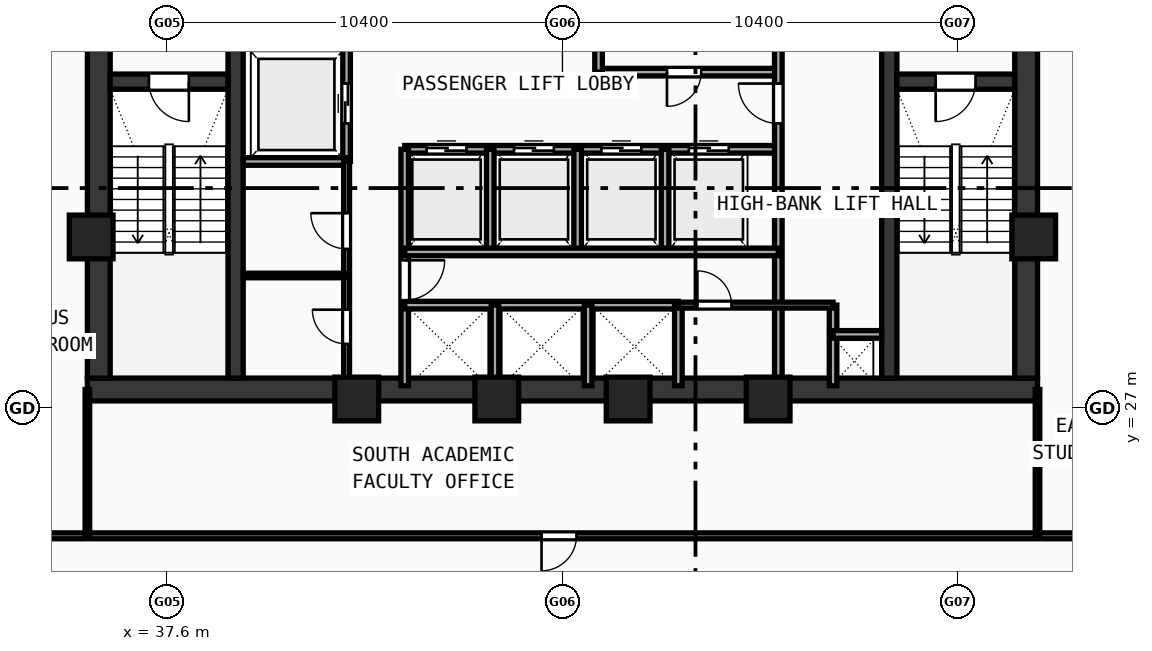
"""IFC4 building model, lengths in metres.
Left out: names, types, materials, properties, quantities, classifications, styles, units other than length and angle.
Written with IfcOpenShell. Run it as: python <this file> out.ifc"""

import sys

from ifc_helpers import new_model, si_unit, direction, frame, frame_2d, origin, origin_with_axes, origin_2d, place, context, subcontext, project, spatial, rectangle, hollow_rectangle, extrude, source, transform, mapped, element, fill, save


model = new_model("IFC4")
c1 = context("Model", 3, precision=1e-05, world=origin(), true_north=direction((0.0, 1.0)))
c2 = subcontext(c1, "Body", "Model", "MODEL_VIEW")
j1 = project(units=[si_unit("LENGTHUNIT", "METRE"), si_unit("PLANEANGLEUNIT", "RADIAN")], contexts=[c1])
p1 = place(None, origin())
s1 = spatial("IfcSite", under=j1, at=p1, CompositionType="ELEMENT")
p2 = place(p1, origin())
s2 = spatial("IfcBuilding", under=s1, at=p2, CompositionType="ELEMENT")
p3 = place(p2, frame((0.0, 0.0, 133.51)))
s3 = spatial("IfcBuildingStorey", under=s2, at=p3, CompositionType="ELEMENT", Elevation=133.51)
p4 = place(p3, frame((35.5, 27.5, 0.0), z_axis=(0.0, 0.0, 1.0), x_axis=(1.0, 0.0, 0.0)))
e1 = element("IfcWall", 1, at=p4, inside=s3, PredefinedType="SHEAR", context=c2, shape_type="SweptSolid", body=[
    extrude(rectangle(XDim=25.0, YDim=0.6, at=frame_2d((12.5, 0.0))), origin(), (0.0, 0.0, 1.0), 3.42),
])
for number, where, z_axis, x_axis in (
    (2, (35.8, 27.8, 0.0), (0.0, 0.0, 1.0), (0.0, 1.0, 0.0)),
    (3, (60.2, 27.8, 0.0), (0.0, 0.0, 1.0), (0.0, 1.0, 0.0)),
):
    element("IfcWall", number, at=place(p3, frame(where, z_axis=z_axis, x_axis=x_axis)), inside=s3, PredefinedType="SHEAR", context=c2, shape_type="SweptSolid", body=[
        extrude(rectangle(XDim=12.1, YDim=0.6, at=frame_2d((6.05, 0.0))), origin(), (0.0, 0.0, 1.0), 3.42),
    ])
p5 = place(p3, frame((39.4, 27.8, 0.0), z_axis=(0.0, 0.0, 1.0), x_axis=(0.0, 1.0, 0.0)))
e4 = element("IfcWall", 4, at=p5, inside=s3, PredefinedType="SHEAR", context=c2, shape_type="SweptSolid", body=[
    extrude(rectangle(XDim=12.1, YDim=0.4, at=frame_2d((6.05, 0.0))), origin(), (0.0, 0.0, 1.0), 3.42),
])
p6 = place(p5, frame((9.95, 0.0, 0.0)))
e5 = element("IfcOpeningElement", 5, at=p6, cuts=e4, PredefinedType="OPENING", context=c2, shape_type="SweptSolid", body=[
    extrude(rectangle(XDim=1.1, YDim=2.1, at=frame_2d((0.55, 1.05))), frame((0.0, 0.21, 0.0), z_axis=(0.0, -1.0, 0.0), x_axis=(1.0, 0.0, 0.0)), (0.0, 0.0, 1.0), 0.42),
])
p7 = place(p3, frame((56.6, 27.8, 0.0), z_axis=(0.0, 0.0, 1.0), x_axis=(0.0, 1.0, 0.0)))
e6 = element("IfcWall", 6, at=p7, inside=s3, PredefinedType="SHEAR", context=c2, shape_type="SweptSolid", body=[
    extrude(rectangle(XDim=12.1, YDim=0.4, at=frame_2d((6.05, 0.0))), origin(), (0.0, 0.0, 1.0), 3.42),
])
p8 = place(p7, frame((9.95, 0.0, 0.0)))
e7 = element("IfcOpeningElement", 7, at=p8, cuts=e6, PredefinedType="OPENING", context=c2, shape_type="SweptSolid", body=[
    extrude(rectangle(XDim=1.1, YDim=2.1, at=frame_2d((0.55, 1.05))), frame((0.0, 0.21, 0.0), z_axis=(0.0, -1.0, 0.0), x_axis=(1.0, 0.0, 0.0)), (0.0, 0.0, 1.0), 0.42),
])
p9 = place(p3, frame((36.1, 35.6, 0.0), z_axis=(0.0, 0.0, 1.0), x_axis=(1.0, 0.0, 0.0)))
e8 = element("IfcWall", 8, at=p9, inside=s3, PredefinedType="SHEAR", context=c2, shape_type="SweptSolid", body=[
    extrude(rectangle(XDim=3.1, YDim=0.4, at=frame_2d((1.55, 0.0))), origin(), (0.0, 0.0, 1.0), 3.42),
])
p10 = place(p9, frame((1.02, 0.0, 0.0)))
e9 = element("IfcOpeningElement", 9, at=p10, cuts=e8, PredefinedType="OPENING", context=c2, shape_type="SweptSolid", body=[
    extrude(rectangle(XDim=1.05, YDim=2.1, at=frame_2d((0.525, 1.05))), frame((0.0, 0.21, 0.0), z_axis=(0.0, -1.0, 0.0), x_axis=(1.0, 0.0, 0.0)), (0.0, 0.0, 1.0), 0.42),
])
p11 = place(p3, frame((56.8, 35.6, 0.0), z_axis=(0.0, 0.0, 1.0), x_axis=(1.0, 0.0, 0.0)))
e10 = element("IfcWall", 10, at=p11, inside=s3, PredefinedType="SHEAR", context=c2, shape_type="SweptSolid", body=[
    extrude(rectangle(XDim=3.1, YDim=0.4, at=frame_2d((1.55, 0.0))), origin(), (0.0, 0.0, 1.0), 3.42),
])
p12 = place(p11, frame((1.02, 0.0, 0.0)))
e11 = element("IfcOpeningElement", 11, at=p12, cuts=e10, PredefinedType="OPENING", context=c2, shape_type="SweptSolid", body=[
    extrude(rectangle(XDim=1.05, YDim=2.1, at=frame_2d((0.525, 1.05))), frame((0.0, 0.21, 0.0), z_axis=(0.0, -1.0, 0.0), x_axis=(1.0, 0.0, 0.0)), (0.0, 0.0, 1.0), 0.42),
])
m1 = source(origin(), c2, "Body", "SweptSolid", [
    extrude(hollow_rectangle(XDim=1.15, YDim=1.15, WallThickness=0.048, at=origin_2d()), origin(), (0.0, 0.0, 1.0), 3.68),
])
for number, where, z_axis, x_axis in (
    (12, (42.588, 27.25, -0.26), (0.0, 0.0, 1.0), (1.0, 0.0, 0.0)),
    (13, (46.272, 27.25, -0.26), (0.0, 0.0, 1.0), (1.0, 0.0, 0.0)),
    (14, (49.729, 27.25, -0.26), (0.0, 0.0, 1.0), (1.0, 0.0, 0.0)),
    (15, (53.412, 27.25, -0.26), (0.0, 0.0, 1.0), (1.0, 0.0, 0.0)),
    (16, (60.4, 31.513, -0.26), (0.0, 0.0, 1.0), (1.0, 0.0, 0.0)),
    (17, (35.6, 31.513, -0.26), (0.0, 0.0, 1.0), (1.0, 0.0, 0.0)),
):
    element("IfcColumn", number, at=place(p3, frame(where, z_axis=z_axis, x_axis=x_axis)), inside=s3, PredefinedType="COLUMN", context=c2, shape_type="MappedRepresentation", body=[
        mapped(m1, transform((0.0, 0.0, 0.0), scale=1.0)),
    ])
p13 = place(p3, frame((42.32, 33.5, 0.0), z_axis=(0.0, 0.0, 1.0), x_axis=(0.0, 1.0, 0.0)))
e18 = element("IfcWall", 18, at=p13, inside=s3, PredefinedType="SOLIDWALL", context=c2, shape_type="SweptSolid", body=[
    extrude(rectangle(XDim=6.45, YDim=0.2, at=frame_2d((3.225, 0.0))), origin(), (0.0, 0.0, 1.0), 3.42),
])
p14 = place(p13, frame((1.0, 0.0, 0.0)))
e19 = element("IfcOpeningElement", 19, at=p14, cuts=e18, PredefinedType="OPENING", context=c2, shape_type="SweptSolid", body=[
    extrude(rectangle(XDim=1.05, YDim=2.1, at=frame_2d((0.525, 1.05))), frame((0.0, 0.11, 0.0), z_axis=(0.0, -1.0, 0.0), x_axis=(1.0, 0.0, 0.0)), (0.0, 0.0, 1.0), 0.22),
])
p15 = place(p3, frame((39.6, 33.5, 0.0), z_axis=(0.0, 0.0, 1.0), x_axis=(1.0, 0.0, 0.0)))
e20 = element("IfcWall", 20, at=p15, inside=s3, PredefinedType="SOLIDWALL", context=c2, shape_type="SweptSolid", body=[
    extrude(rectangle(XDim=2.72, YDim=0.2, at=frame_2d((1.36, 0.0))), origin(), (0.0, 0.0, 1.0), 3.42),
])
p16 = place(p3, frame((48.95, 35.85, 0.0), z_axis=(0.0, 0.0, 1.0), x_axis=(1.0, 0.0, 0.0)))
e21 = element("IfcWall", 21, at=p16, inside=s3, PredefinedType="SOLIDWALL", context=c2, shape_type="SweptSolid", body=[
    extrude(rectangle(XDim=4.73, YDim=0.2, at=frame_2d((2.365, 0.0))), origin(), (0.0, 0.0, 1.0), 3.42),
])
p17 = place(p16, frame((1.8, 0.0, 0.0)))
e22 = element("IfcOpeningElement", 22, at=p17, cuts=e21, PredefinedType="OPENING", context=c2, shape_type="SweptSolid", body=[
    extrude(rectangle(XDim=0.9, YDim=2.1, at=frame_2d((0.45, 1.05))), frame((0.0, 0.11, 0.0), z_axis=(0.0, -1.0, 0.0), x_axis=(1.0, 0.0, 0.0)), (0.0, 0.0, 1.0), 0.22),
])
p18 = place(p3, frame((48.95, 35.85, 0.0), z_axis=(0.0, 0.0, 1.0), x_axis=(0.0, 1.0, 0.0)))
e23 = element("IfcWall", 23, at=p18, inside=s3, PredefinedType="SOLIDWALL", context=c2, shape_type="SweptSolid", body=[
    extrude(rectangle(XDim=4.1, YDim=0.2, at=frame_2d((2.05, 0.0))), origin(), (0.0, 0.0, 1.0), 3.42),
])
p19 = place(p3, frame((43.85, 33.82, 0.0), z_axis=(0.0, 0.0, 1.0), x_axis=(1.0, 0.0, 0.0)))
e24 = element("IfcWall", 24, at=p19, inside=s3, PredefinedType="SOLIDWALL", context=c2, shape_type="SweptSolid", body=[
    extrude(rectangle(XDim=9.83, YDim=0.2, at=frame_2d((4.915, 0.0))), origin(), (0.0, 0.0, 1.0), 3.42),
])
p20 = place(p19, frame((0.575, 0.0, 0.0)))
e25 = element("IfcOpeningElement", 25, at=p20, cuts=e24, PredefinedType="OPENING", context=c2, shape_type="SweptSolid", body=[
    extrude(rectangle(XDim=1.05, YDim=2.1, at=frame_2d((0.525, 1.05))), frame((0.0, 0.11, 0.0), z_axis=(0.0, -1.0, 0.0), x_axis=(1.0, 0.0, 0.0)), (0.0, 0.0, 1.0), 0.22),
])
p21 = place(p19, frame((2.875, 0.0, 0.0)))
e26 = element("IfcOpeningElement", 26, at=p21, cuts=e24, PredefinedType="OPENING", context=c2, shape_type="SweptSolid", body=[
    extrude(rectangle(XDim=1.05, YDim=2.1, at=frame_2d((0.525, 1.05))), frame((0.0, 0.11, 0.0), z_axis=(0.0, -1.0, 0.0), x_axis=(1.0, 0.0, 0.0)), (0.0, 0.0, 1.0), 0.22),
])
p22 = place(p19, frame((5.175, 0.0, 0.0)))
e27 = element("IfcOpeningElement", 27, at=p22, cuts=e24, PredefinedType="OPENING", context=c2, shape_type="SweptSolid", body=[
    extrude(rectangle(XDim=1.05, YDim=2.1, at=frame_2d((0.525, 1.05))), frame((0.0, 0.11, 0.0), z_axis=(0.0, -1.0, 0.0), x_axis=(1.0, 0.0, 0.0)), (0.0, 0.0, 1.0), 0.22),
])
p23 = place(p19, frame((7.475, 0.0, 0.0)))
e28 = element("IfcOpeningElement", 28, at=p23, cuts=e24, PredefinedType="OPENING", context=c2, shape_type="SweptSolid", body=[
    extrude(rectangle(XDim=1.05, YDim=2.1, at=frame_2d((0.525, 1.05))), frame((0.0, 0.11, 0.0), z_axis=(0.0, -1.0, 0.0), x_axis=(1.0, 0.0, 0.0)), (0.0, 0.0, 1.0), 0.22),
])
p24 = place(p3, frame((43.85, 27.6, 0.0), z_axis=(0.0, 0.0, 1.0), x_axis=(0.0, 1.0, 0.0)))
e29 = element("IfcWall", 29, at=p24, inside=s3, PredefinedType="SOLIDWALL", context=c2, shape_type="SweptSolid", body=[
    extrude(rectangle(XDim=6.22, YDim=0.2, at=frame_2d((3.11, 0.0))), origin(), (0.0, 0.0, 1.0), 3.42),
])
p25 = place(p24, frame((2.25, 0.0, 0.0)))
e30 = element("IfcOpeningElement", 30, at=p25, cuts=e29, PredefinedType="OPENING", context=c2, shape_type="SweptSolid", body=[
    extrude(rectangle(XDim=1.05, YDim=2.1, at=frame_2d((0.525, 1.05))), frame((0.0, 0.11, 0.0), z_axis=(0.0, -1.0, 0.0), x_axis=(1.0, 0.0, 0.0)), (0.0, 0.0, 1.0), 0.22),
])
p26 = place(p3, frame((53.68, 27.6, 0.0), z_axis=(0.0, 0.0, 1.0), x_axis=(0.0, 1.0, 0.0)))
e31 = element("IfcWall", 31, at=p26, inside=s3, PredefinedType="SOLIDWALL", context=c2, shape_type="SweptSolid", body=[
    extrude(rectangle(XDim=9.05, YDim=0.2, at=frame_2d((4.525, 0.0))), origin(), (0.0, 0.0, 1.0), 3.42),
])
p27 = place(p26, frame((6.9, 0.0, 0.0)))
e32 = element("IfcOpeningElement", 32, at=p27, cuts=e31, PredefinedType="OPENING", context=c2, shape_type="SweptSolid", body=[
    extrude(rectangle(XDim=1.05, YDim=2.1, at=frame_2d((0.525, 1.05))), frame((0.0, 0.11, 0.0), z_axis=(0.0, -1.0, 0.0), x_axis=(1.0, 0.0, 0.0)), (0.0, 0.0, 1.0), 0.22),
])
for number, where, z_axis, x_axis in (
    (33, (46.1, 31.12, 0.0), (0.0, 0.0, 1.0), (0.0, 1.0, 0.0)),
    (34, (48.4, 31.12, 0.0), (0.0, 0.0, 1.0), (0.0, 1.0, 0.0)),
    (35, (50.7, 31.12, 0.0), (0.0, 0.0, 1.0), (0.0, 1.0, 0.0)),
):
    element("IfcWall", number, at=place(p3, frame(where, z_axis=z_axis, x_axis=x_axis)), inside=s3, PredefinedType="SOLIDWALL", context=c2, shape_type="SweptSolid", body=[
        extrude(rectangle(XDim=2.7, YDim=0.2, at=frame_2d((1.35, 0.0))), origin(), (0.0, 0.0, 1.0), 3.42),
    ])
p28 = place(p3, frame((43.85, 29.72, 0.0), z_axis=(0.0, 0.0, 1.0), x_axis=(1.0, 0.0, 0.0)))
e36 = element("IfcWall", 36, at=p28, inside=s3, PredefinedType="SOLIDWALL", context=c2, shape_type="SweptSolid", body=[
    extrude(rectangle(XDim=7.2, YDim=0.2, at=frame_2d((3.6, 0.0))), origin(), (0.0, 0.0, 1.0), 3.42),
])
p29 = place(p3, frame((51.05, 27.6, 0.0), z_axis=(0.0, 0.0, 1.0), x_axis=(0.0, 1.0, 0.0)))
e37 = element("IfcWall", 37, at=p29, inside=s3, PredefinedType="SOLIDWALL", context=c2, shape_type="SweptSolid", body=[
    extrude(rectangle(XDim=2.12, YDim=0.2, at=frame_2d((1.06, 0.0))), origin(), (0.0, 0.0, 1.0), 3.42),
])
p30 = place(p3, frame((43.85, 31.12, 0.0), z_axis=(0.0, 0.0, 1.0), x_axis=(1.0, 0.0, 0.0)))
e38 = element("IfcWall", 38, at=p30, inside=s3, PredefinedType="SOLIDWALL", context=c2, shape_type="SweptSolid", body=[
    extrude(rectangle(XDim=9.83, YDim=0.2, at=frame_2d((4.915, 0.0))), origin(), (0.0, 0.0, 1.0), 3.42),
])
for number, where, z_axis, x_axis in (
    (39, (46.225, 27.6, 0.0), (0.0, 0.0, 1.0), (0.0, 1.0, 0.0)),
    (40, (48.675, 27.6, 0.0), (0.0, 0.0, 1.0), (0.0, 1.0, 0.0)),
    (41, (55.12, 27.6, 0.0), (0.0, 0.0, 1.0), (0.0, 1.0, 0.0)),
):
    element("IfcWall", number, at=place(p3, frame(where, z_axis=z_axis, x_axis=x_axis)), inside=s3, PredefinedType="SOLIDWALL", context=c2, shape_type="SweptSolid", body=[
        extrude(rectangle(XDim=2.12, YDim=0.2, at=frame_2d((1.06, 0.0))), origin(), (0.0, 0.0, 1.0), 3.42),
    ])
p31 = place(p3, frame((55.12, 28.95, 0.0), z_axis=(0.0, 0.0, 1.0), x_axis=(1.0, 0.0, 0.0)))
e42 = element("IfcWall", 42, at=p31, inside=s3, PredefinedType="SOLIDWALL", context=c2, shape_type="SweptSolid", body=[
    extrude(rectangle(XDim=1.28, YDim=0.2, at=frame_2d((0.64, 0.0))), origin(), (0.0, 0.0, 1.0), 3.42),
])
p32 = place(p3, frame((42.32, 27.6, 0.0), z_axis=(0.0, 0.0, 1.0), x_axis=(0.0, 1.0, 0.0)))
e43 = element("IfcWall", 43, at=p32, inside=s3, PredefinedType="PARTITIONING", context=c2, shape_type="SweptSolid", body=[
    extrude(rectangle(XDim=5.9, YDim=0.155, at=frame_2d((2.95, 0.0))), origin(), (0.0, 0.0, 1.0), 3.42),
])
p33 = place(p32, frame((1.1, 0.0, 0.0)))
e44 = element("IfcOpeningElement", 44, at=p33, cuts=e43, PredefinedType="OPENING", context=c2, shape_type="SweptSolid", body=[
    extrude(rectangle(XDim=0.9, YDim=2.1, at=frame_2d((0.45, 1.05))), frame((0.0, 0.087, 0.0), z_axis=(0.0, -1.0, 0.0), x_axis=(1.0, 0.0, 0.0)), (0.0, 0.0, 1.0), 0.175),
])
p34 = place(p32, frame((3.6, 0.0, 0.0)))
e45 = element("IfcOpeningElement", 45, at=p34, cuts=e43, PredefinedType="OPENING", context=c2, shape_type="SweptSolid", body=[
    extrude(rectangle(XDim=0.94, YDim=2.1, at=frame_2d((0.47, 1.05))), frame((0.0, 0.087, 0.0), z_axis=(0.0, -1.0, 0.0), x_axis=(1.0, 0.0, 0.0)), (0.0, 0.0, 1.0), 0.175),
])
p35 = place(p3, frame((51.05, 29.72, 0.0), z_axis=(0.0, 0.0, 1.0), x_axis=(1.0, 0.0, 0.0)))
e46 = element("IfcWall", 46, at=p35, inside=s3, PredefinedType="PARTITIONING", context=c2, shape_type="SweptSolid", body=[
    extrude(rectangle(XDim=4.07, YDim=0.155, at=frame_2d((2.035, 0.0))), origin(), (0.0, 0.0, 1.0), 3.42),
])
p36 = place(p35, frame((0.5, 0.0, 0.0)))
e47 = element("IfcOpeningElement", 47, at=p36, cuts=e46, PredefinedType="OPENING", context=c2, shape_type="SweptSolid", body=[
    extrude(rectangle(XDim=0.9, YDim=2.1, at=frame_2d((0.45, 1.05))), frame((0.0, 0.087, 0.0), z_axis=(0.0, -1.0, 0.0), x_axis=(1.0, 0.0, 0.0)), (0.0, 0.0, 1.0), 0.175),
])
p37 = place(p3, frame((39.6, 30.5, 0.0), z_axis=(0.0, 0.0, 1.0), x_axis=(1.0, 0.0, 0.0)))
e48 = element("IfcWall", 48, at=p37, inside=s3, PredefinedType="PARTITIONING", context=c2, shape_type="SweptSolid", body=[
    extrude(rectangle(XDim=2.72, YDim=0.12, at=frame_2d((1.36, 0.0))), origin(), (0.0, 0.0, 1.0), 3.42),
])
p38 = place(p3, frame((31.45, 23.65, 0.0), z_axis=(0.0, 0.0, 1.0), x_axis=(1.0, 0.0, 0.0)))
e49 = element("IfcWall", 49, at=p38, inside=s3, PredefinedType="PARTITIONING", context=c2, shape_type="SweptSolid", body=[
    extrude(rectangle(XDim=33.1, YDim=0.155, at=frame_2d((16.55, 0.0))), origin(), (0.0, 0.0, 1.0), 2.77),
])
p39 = place(p38, frame((16.0, 0.0, 0.0)))
e50 = element("IfcOpeningElement", 50, at=p39, cuts=e49, PredefinedType="OPENING", context=c2, shape_type="SweptSolid", body=[
    extrude(rectangle(XDim=0.92, YDim=2.1, at=frame_2d((0.46, 1.05))), frame((0.0, 0.087, 0.0), z_axis=(0.0, -1.0, 0.0), x_axis=(1.0, 0.0, 0.0)), (0.0, 0.0, 1.0), 0.175),
])
for number, where, z_axis, x_axis in (
    (51, (35.5, 23.65, 0.0), (0.0, 0.0, 1.0), (0.0, 1.0, 0.0)),
    (52, (60.5, 23.65, 0.0), (0.0, 0.0, 1.0), (0.0, 1.0, 0.0)),
):
    element("IfcWall", number, at=place(p3, frame(where, z_axis=z_axis, x_axis=x_axis)), inside=s3, PredefinedType="PARTITIONING", context=c2, shape_type="SweptSolid", body=[
        extrude(rectangle(XDim=3.85, YDim=0.12, at=frame_2d((1.925, 0.0))), origin(), (0.0, 0.0, 1.0), 3.02),
    ])
m2 = source(origin(), c2, "Body", "SweptSolid", [
    extrude(rectangle(XDim=1.05, YDim=2.1, at=frame_2d((0.525, 1.05))), frame((0.0, 0.025, 0.0), z_axis=(0.0, -1.0, 0.0), x_axis=(1.0, 0.0, 0.0)), (0.0, 0.0, 1.0), 0.05),
])
p40 = place(p10, frame((1.05, 0.0, 0.0), z_axis=(0.0, 0.0, 1.0), x_axis=(-1.0, 0.0, 0.0)))
e53 = element("IfcDoor", 53, at=p40, inside=s3, OperationType="SINGLE_SWING_LEFT", PredefinedType="DOOR", context=c2, shape_type="MappedRepresentation", body=[
    mapped(m2, transform((0.0, 0.0, 0.0), scale=1.0)),
])
fill(e9, e53)
p41 = place(p12, frame((1.05, 0.0, 0.0), z_axis=(0.0, 0.0, 1.0), x_axis=(-1.0, 0.0, 0.0)))
e54 = element("IfcDoor", 54, at=p41, inside=s3, OperationType="SINGLE_SWING_RIGHT", PredefinedType="DOOR", context=c2, shape_type="MappedRepresentation", body=[
    mapped(m2, transform((0.0, 0.0, 0.0), scale=1.0)),
])
fill(e11, e54)
p42 = place(p14, origin_with_axes())
e55 = element("IfcDoor", 55, at=p42, inside=s3, OperationType="DOUBLE_DOOR_SLIDING", PredefinedType="DOOR", context=c2, shape_type="MappedRepresentation", body=[
    mapped(m2, transform((0.0, 0.0, 0.0), scale=1.0)),
])
fill(e19, e55)
m3 = source(origin(), c2, "Body", "SweptSolid", [
    extrude(rectangle(XDim=0.9, YDim=2.1, at=frame_2d((0.45, 1.05))), frame((0.0, 0.025, 0.0), z_axis=(0.0, -1.0, 0.0), x_axis=(1.0, 0.0, 0.0)), (0.0, 0.0, 1.0), 0.05),
])
p43 = place(p17, frame((0.9, 0.0, 0.0), z_axis=(0.0, 0.0, 1.0), x_axis=(-1.0, 0.0, 0.0)))
e56 = element("IfcDoor", 56, at=p43, inside=s3, OperationType="SINGLE_SWING_RIGHT", PredefinedType="DOOR", context=c2, shape_type="MappedRepresentation", body=[
    mapped(m3, transform((0.0, 0.0, 0.0), scale=1.0)),
])
fill(e22, e56)
p44 = place(p20, origin_with_axes())
e57 = element("IfcDoor", 57, at=p44, inside=s3, OperationType="DOUBLE_DOOR_SLIDING", PredefinedType="DOOR", context=c2, shape_type="MappedRepresentation", body=[
    mapped(m2, transform((0.0, 0.0, 0.0), scale=1.0)),
])
fill(e25, e57)
p45 = place(p21, origin_with_axes())
e58 = element("IfcDoor", 58, at=p45, inside=s3, OperationType="DOUBLE_DOOR_SLIDING", PredefinedType="DOOR", context=c2, shape_type="MappedRepresentation", body=[
    mapped(m2, transform((0.0, 0.0, 0.0), scale=1.0)),
])
fill(e26, e58)
p46 = place(p22, origin_with_axes())
e59 = element("IfcDoor", 59, at=p46, inside=s3, OperationType="DOUBLE_DOOR_SLIDING", PredefinedType="DOOR", context=c2, shape_type="MappedRepresentation", body=[
    mapped(m2, transform((0.0, 0.0, 0.0), scale=1.0)),
])
fill(e27, e59)
p47 = place(p23, origin_with_axes())
e60 = element("IfcDoor", 60, at=p47, inside=s3, OperationType="DOUBLE_DOOR_SLIDING", PredefinedType="DOOR", context=c2, shape_type="MappedRepresentation", body=[
    mapped(m2, transform((0.0, 0.0, 0.0), scale=1.0)),
])
fill(e28, e60)
p48 = place(p25, frame((1.05, 0.0, 0.0), z_axis=(0.0, 0.0, 1.0), x_axis=(-1.0, 0.0, 0.0)))
e61 = element("IfcDoor", 61, at=p48, inside=s3, OperationType="SINGLE_SWING_LEFT", PredefinedType="DOOR", context=c2, shape_type="MappedRepresentation", body=[
    mapped(m2, transform((0.0, 0.0, 0.0), scale=1.0)),
])
fill(e30, e61)
p49 = place(p27, origin_with_axes())
e62 = element("IfcDoor", 62, at=p49, inside=s3, OperationType="SINGLE_SWING_RIGHT", PredefinedType="DOOR", context=c2, shape_type="MappedRepresentation", body=[
    mapped(m2, transform((0.0, 0.0, 0.0), scale=1.0)),
])
fill(e32, e62)
p50 = place(p33, origin_with_axes())
e63 = element("IfcDoor", 63, at=p50, inside=s3, OperationType="SINGLE_SWING_RIGHT", PredefinedType="DOOR", context=c2, shape_type="MappedRepresentation", body=[
    mapped(m3, transform((0.0, 0.0, 0.0), scale=1.0)),
])
fill(e44, e63)
m4 = source(origin(), c2, "Body", "SweptSolid", [
    extrude(rectangle(XDim=0.94, YDim=2.1, at=frame_2d((0.47, 1.05))), frame((0.0, 0.025, 0.0), z_axis=(0.0, -1.0, 0.0), x_axis=(1.0, 0.0, 0.0)), (0.0, 0.0, 1.0), 0.05),
])
p51 = place(p34, origin_with_axes())
e64 = element("IfcDoor", 64, at=p51, inside=s3, OperationType="SINGLE_SWING_RIGHT", PredefinedType="DOOR", context=c2, shape_type="MappedRepresentation", body=[
    mapped(m4, transform((0.0, 0.0, 0.0), scale=1.0)),
])
fill(e45, e64)
p52 = place(p36, origin_with_axes())
e65 = element("IfcDoor", 65, at=p52, inside=s3, OperationType="SINGLE_SWING_LEFT", PredefinedType="DOOR", context=c2, shape_type="MappedRepresentation", body=[
    mapped(m3, transform((0.0, 0.0, 0.0), scale=1.0)),
])
fill(e47, e65)
m5 = source(origin(), c2, "Body", "SweptSolid", [
    extrude(rectangle(XDim=0.92, YDim=2.1, at=frame_2d((0.46, 1.05))), frame((0.0, 0.025, 0.0), z_axis=(0.0, -1.0, 0.0), x_axis=(1.0, 0.0, 0.0)), (0.0, 0.0, 1.0), 0.05),
])
p53 = place(p39, frame((0.92, 0.0, 0.0), z_axis=(0.0, 0.0, 1.0), x_axis=(-1.0, 0.0, 0.0)))
e66 = element("IfcDoor", 66, at=p53, inside=s3, OperationType="SINGLE_SWING_RIGHT", PredefinedType="DOOR", context=c2, shape_type="MappedRepresentation", body=[
    mapped(m5, transform((0.0, 0.0, 0.0), scale=1.0)),
])
fill(e50, e66)
save(model, sys.argv[1])
